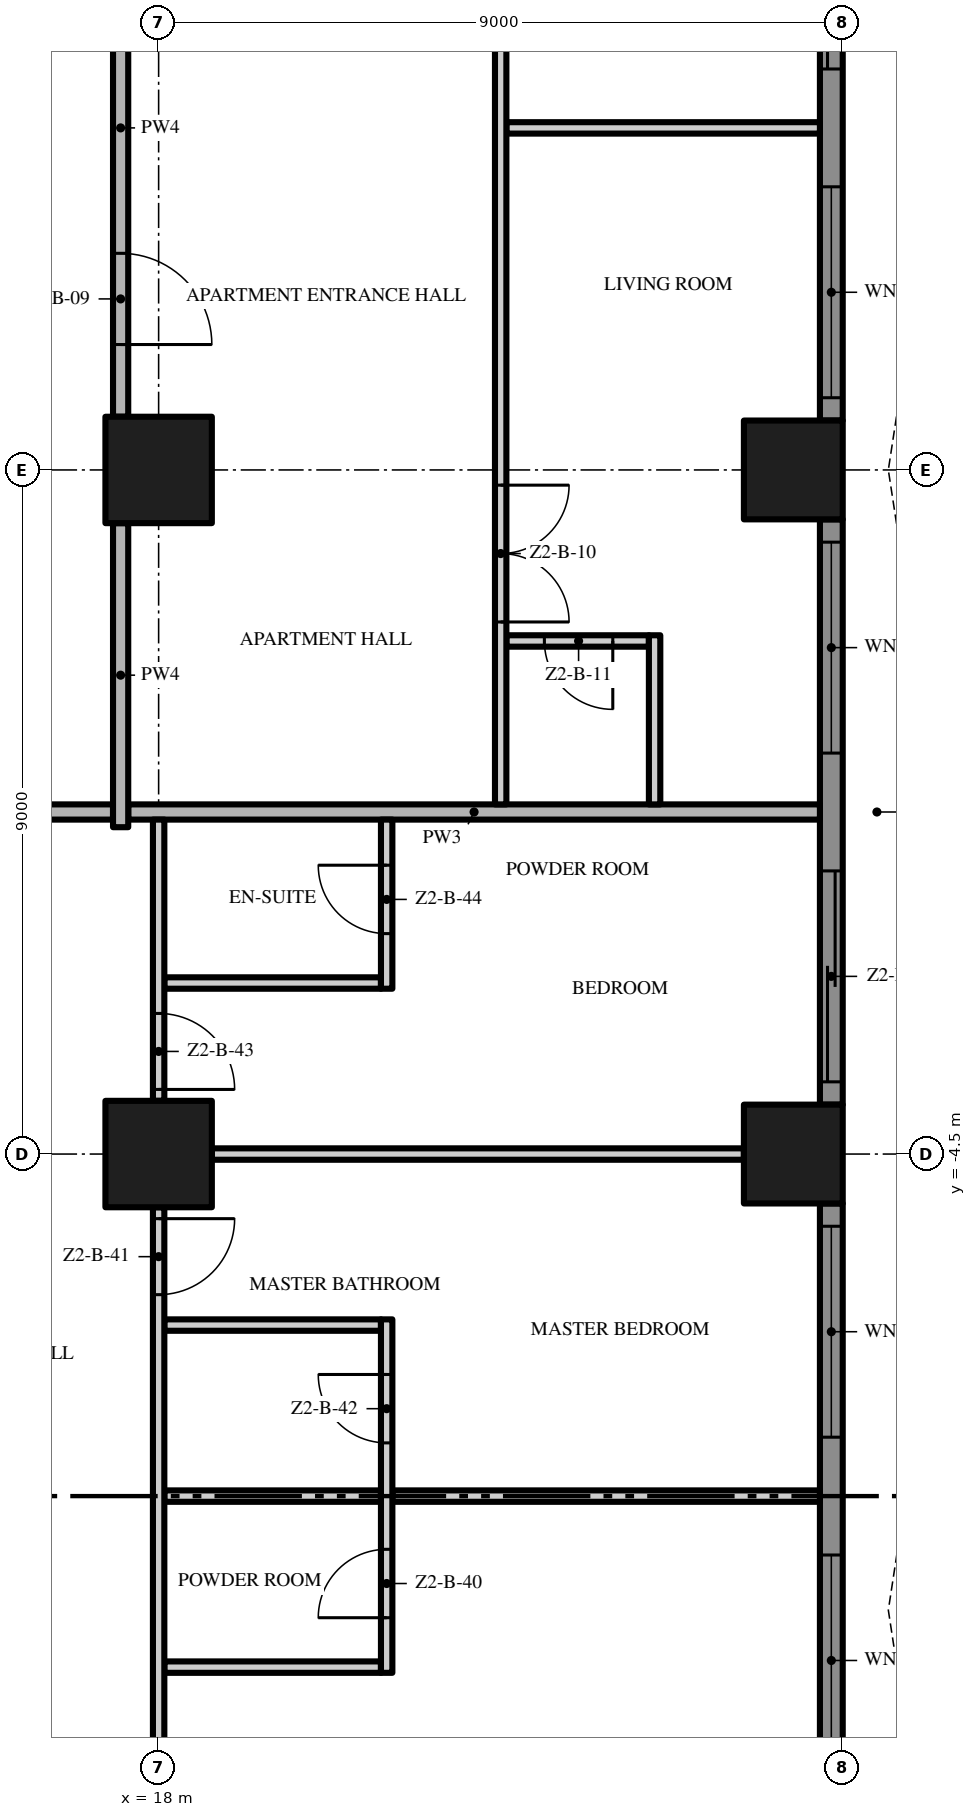
"""IFC4 building model, lengths in metres.
Left out: names, types, materials, properties, quantities, classifications, styles, units other than length and angle.
Written with IfcOpenShell. Run it as: python <this file> out.ifc"""

import sys

from ifc_helpers import new_model, si_unit, direction, frame, frame_2d, origin, origin_2d, place, context, subcontext, project, spatial, polyline, rectangle, outline, extrude, element, fill, save


model = new_model("IFC4")
c1 = context("Model", 3, precision=1e-05, world=origin(), true_north=direction((0.0, 1.0)))
c2 = subcontext(c1, "Body", "Model", "MODEL_VIEW")
j1 = project(units=[si_unit("LENGTHUNIT", "METRE"), si_unit("PLANEANGLEUNIT", "RADIAN")], contexts=[c1])
p1 = place(None, origin())
s1 = spatial("IfcSite", under=j1, at=p1, CompositionType="ELEMENT")
p2 = place(p1, origin())
s2 = spatial("IfcBuilding", under=s1, at=p2, CompositionType="ELEMENT")
p3 = place(p2, frame((0.0, 0.0, 84.6)))
s3 = spatial("IfcBuildingStorey", under=s2, at=p3, CompositionType="ELEMENT", Elevation=84.6)
for number, where, z_axis, x_axis in (
    (1, (18.0, -4.5, 0.0), (0.0, 0.0, 1.0), (1.0, 0.0, 0.0)),
    (2, (18.0, 4.5, 0.0), (0.0, 0.0, 1.0), (1.0, 0.0, 0.0)),
):
    element("IfcColumn", number, at=place(p3, frame(where, z_axis=z_axis, x_axis=x_axis)), inside=s3, PredefinedType="COLUMN", context=c2, shape_type="SweptSolid", body=[
        extrude(rectangle(XDim=1.4, YDim=1.4, at=origin_2d()), origin(), (0.0, 0.0, 1.0), 3.5),
    ])
for number, where, z_axis, x_axis in (
    (3, (26.35, -4.5, 0.0), (0.0, 0.0, 1.0), (1.0, 0.0, 0.0)),
    (4, (26.35, 4.5, 0.0), (0.0, 0.0, 1.0), (1.0, 0.0, 0.0)),
):
    element("IfcColumn", number, at=place(p3, frame(where, z_axis=z_axis, x_axis=x_axis)), inside=s3, PredefinedType="COLUMN", context=c2, shape_type="SweptSolid", body=[
        extrude(rectangle(XDim=1.3, YDim=1.3, at=origin_2d()), origin(), (0.0, 0.0, 1.0), 3.5),
    ])
p4 = place(p3, frame((26.85, -5.15, 0.0), z_axis=(0.0, 0.0, 1.0), x_axis=(0.0, -1.0, 0.0)))
e5 = element("IfcWall", 5, at=p4, inside=s3, PredefinedType="SOLIDWALL", context=c2, shape_type="SweptSolid", body=[
    extrude(rectangle(XDim=7.7, YDim=0.3, at=frame_2d((3.85, 0.0))), origin(), (0.0, 0.0, 1.0), 3.5),
])
p5 = place(p4, frame((4.625, 0.0, 0.45)))
e6 = element("IfcOpeningElement", 6, at=p5, cuts=e5, PredefinedType="OPENING", context=c2, shape_type="SweptSolid", body=[
    extrude(rectangle(XDim=2.775, YDim=2.65, at=frame_2d((1.387, 1.325))), frame((0.0, 0.16, 0.0), z_axis=(0.0, -1.0, 0.0), x_axis=(1.0, 0.0, 0.0)), (0.0, 0.0, 1.0), 0.32),
])
p6 = place(p4, frame((0.3, 0.0, 0.45)))
e7 = element("IfcOpeningElement", 7, at=p6, cuts=e5, PredefinedType="OPENING", context=c2, shape_type="SweptSolid", body=[
    extrude(rectangle(XDim=2.775, YDim=2.65, at=frame_2d((1.387, 1.325))), frame((0.0, 0.16, 0.0), z_axis=(0.0, -1.0, 0.0), x_axis=(1.0, 0.0, 0.0)), (0.0, 0.0, 1.0), 0.32),
])
p7 = place(p3, frame((26.85, 3.85, 0.0), z_axis=(0.0, 0.0, 1.0), x_axis=(0.0, -1.0, 0.0)))
e8 = element("IfcWall", 8, at=p7, inside=s3, PredefinedType="SOLIDWALL", context=c2, shape_type="SweptSolid", body=[
    extrude(rectangle(XDim=7.7, YDim=0.3, at=frame_2d((3.85, 0.0))), origin(), (0.0, 0.0, 1.0), 3.5),
])
p8 = place(p7, frame((4.625, 0.0, 0.0)))
e9 = element("IfcOpeningElement", 9, at=p8, cuts=e8, PredefinedType="OPENING", context=c2, shape_type="SweptSolid", body=[
    extrude(rectangle(XDim=2.775, YDim=2.4, at=frame_2d((1.387, 1.2))), frame((0.0, 0.16, 0.0), z_axis=(0.0, -1.0, 0.0), x_axis=(1.0, 0.0, 0.0)), (0.0, 0.0, 1.0), 0.32),
])
p9 = place(p7, frame((0.3, 0.0, 0.45)))
e10 = element("IfcOpeningElement", 10, at=p9, cuts=e8, PredefinedType="OPENING", context=c2, shape_type="SweptSolid", body=[
    extrude(rectangle(XDim=2.775, YDim=2.65, at=frame_2d((1.387, 1.325))), frame((0.0, 0.16, 0.0), z_axis=(0.0, -1.0, 0.0), x_axis=(1.0, 0.0, 0.0)), (0.0, 0.0, 1.0), 0.32),
])
p10 = place(p3, frame((26.85, 12.85, 0.0), z_axis=(0.0, 0.0, 1.0), x_axis=(0.0, -1.0, 0.0)))
e11 = element("IfcWall", 11, at=p10, inside=s3, PredefinedType="SOLIDWALL", context=c2, shape_type="SweptSolid", body=[
    extrude(rectangle(XDim=7.7, YDim=0.3, at=frame_2d((3.85, 0.0))), origin(), (0.0, 0.0, 1.0), 3.5),
])
p11 = place(p10, frame((4.625, 0.0, 0.45)))
e12 = element("IfcOpeningElement", 12, at=p11, cuts=e11, PredefinedType="OPENING", context=c2, shape_type="SweptSolid", body=[
    extrude(rectangle(XDim=2.775, YDim=2.65, at=frame_2d((1.387, 1.325))), frame((0.0, 0.16, 0.0), z_axis=(0.0, -1.0, 0.0), x_axis=(1.0, 0.0, 0.0)), (0.0, 0.0, 1.0), 0.32),
])
p12 = place(p10, frame((0.3, 0.0, 0.0)))
e13 = element("IfcOpeningElement", 13, at=p12, cuts=e11, PredefinedType="OPENING", context=c2, shape_type="SweptSolid", body=[
    extrude(rectangle(XDim=2.775, YDim=2.4, at=frame_2d((1.387, 1.2))), frame((0.0, 0.16, 0.0), z_axis=(0.0, -1.0, 0.0), x_axis=(1.0, 0.0, 0.0)), (0.0, 0.0, 1.0), 0.32),
])
p13 = place(p3, origin())
e14 = element("IfcWall", 14, at=p13, inside=s3, PredefinedType="USERDEFINED", context=c2, shape_type="SweptSolid", body=[
    extrude(outline(polyline([(30.0, -18.0), (29.771, -16.5), (29.171, -15.0), (28.429, -13.5), (27.829, -12.0), (27.6, -10.5), (27.829, -9.0), (28.429, -7.5), (29.171, -6.0), (29.771, -4.5), (30.0, -3.0), (29.771, -1.5), (29.171, 0.0), (28.429, 1.5), (27.829, 3.0), (27.6, 4.5), (27.829, 6.0), (28.429, 7.5), (29.171, 9.0), (29.771, 10.5), (30.0, 12.0), (29.771, 13.5), (29.171, 15.0), (28.429, 16.5), (27.829, 18.0), (27.597, 17.907), (28.201, 16.398), (28.942, 14.898), (29.528, 13.434), (29.747, 12.0), (29.528, 10.566), (28.942, 9.102), (28.201, 7.602), (27.586, 6.066), (27.347, 4.5), (27.586, 2.934), (28.201, 1.398), (28.942, -0.102), (29.528, -1.566), (29.747, -3.0), (29.528, -4.434), (28.942, -5.898), (28.201, -7.398), (27.586, -8.934), (27.347, -10.5), (27.586, -12.066), (28.201, -13.602), (28.942, -15.102), (29.528, -16.566), (29.753, -18.038), (30.0, -18.0)])), origin(), (0.0, 0.0, 1.0), 0.9),
])
for number, where, z_axis, x_axis in (
    (15, (18.075, -11.25, 0.0), (0.0, 0.0, 1.0), (1.0, 0.0, 0.0)),
    (16, (18.075, -9.0, 0.0), (0.0, 0.0, 1.0), (1.0, 0.0, 0.0)),
):
    element("IfcWall", number, at=place(p3, frame(where, z_axis=z_axis, x_axis=x_axis)), inside=s3, PredefinedType="PARTITIONING", context=c2, shape_type="SweptSolid", body=[
        extrude(rectangle(XDim=2.85, YDim=0.15, at=frame_2d((1.425, 0.0))), origin(), (0.0, 0.0, 1.0), 3.5),
    ])
p14 = place(p3, frame((21.075, -9.0, 0.0), z_axis=(0.0, 0.0, 1.0), x_axis=(1.0, 0.0, 0.0)))
e17 = element("IfcWall", 17, at=p14, inside=s3, PredefinedType="PARTITIONING", context=c2, shape_type="SweptSolid", body=[
    extrude(rectangle(XDim=5.625, YDim=0.15, at=frame_2d((2.812, 0.0))), origin(), (0.0, 0.0, 1.0), 3.5),
])
p15 = place(p3, frame((18.075, -6.75, 0.0), z_axis=(0.0, 0.0, 1.0), x_axis=(1.0, 0.0, 0.0)))
e18 = element("IfcWall", 18, at=p15, inside=s3, PredefinedType="PARTITIONING", context=c2, shape_type="SweptSolid", body=[
    extrude(rectangle(XDim=2.85, YDim=0.15, at=frame_2d((1.425, 0.0))), origin(), (0.0, 0.0, 1.0), 3.5),
])
p16 = place(p3, frame((18.7, -4.5, 0.0), z_axis=(0.0, 0.0, 1.0), x_axis=(1.0, 0.0, 0.0)))
e19 = element("IfcWall", 19, at=p16, inside=s3, PredefinedType="PARTITIONING", context=c2, shape_type="SweptSolid", body=[
    extrude(rectangle(XDim=7.0, YDim=0.15, at=frame_2d((3.5, 0.0))), origin(), (0.0, 0.0, 1.0), 3.5),
])
p17 = place(p3, frame((18.075, -2.25, 0.0), z_axis=(0.0, 0.0, 1.0), x_axis=(1.0, 0.0, 0.0)))
e20 = element("IfcWall", 20, at=p17, inside=s3, PredefinedType="PARTITIONING", context=c2, shape_type="SweptSolid", body=[
    extrude(rectangle(XDim=2.85, YDim=0.15, at=frame_2d((1.425, 0.0))), origin(), (0.0, 0.0, 1.0), 3.5),
])
p18 = place(p3, frame((4.6, 0.0, 0.0), z_axis=(0.0, 0.0, 1.0), x_axis=(1.0, 0.0, 0.0)))
e21 = element("IfcWall", 21, at=p18, inside=s3, PredefinedType="PARTITIONING", context=c2, shape_type="SweptSolid", body=[
    extrude(rectangle(XDim=12.8, YDim=0.2, at=frame_2d((6.4, 0.0))), origin(), (0.0, 0.0, 1.0), 3.5),
])
p19 = place(p3, frame((17.6, 0.0, 0.0), z_axis=(0.0, 0.0, 1.0), x_axis=(1.0, 0.0, 0.0)))
e22 = element("IfcWall", 22, at=p19, inside=s3, PredefinedType="PARTITIONING", context=c2, shape_type="SweptSolid", body=[
    extrude(rectangle(XDim=9.1, YDim=0.2, at=frame_2d((4.55, 0.0))), origin(), (0.0, 0.0, 1.0), 3.5),
])
p20 = place(p3, frame((24.45, 2.25, 0.0), z_axis=(0.0, 0.0, 1.0), x_axis=(-1.0, 0.0, 0.0)))
e23 = element("IfcWall", 23, at=p20, inside=s3, PredefinedType="PARTITIONING", context=c2, shape_type="SweptSolid", body=[
    extrude(rectangle(XDim=1.875, YDim=0.15, at=frame_2d((0.938, 0.0))), origin(), (0.0, 0.0, 1.0), 3.5),
])
p21 = place(p20, frame((0.475, 0.0, 0.0)))
e24 = element("IfcOpeningElement", 24, at=p21, cuts=e23, PredefinedType="OPENING", context=c2, shape_type="SweptSolid", body=[
    extrude(rectangle(XDim=0.9, YDim=2.1, at=frame_2d((0.45, 1.05))), frame((0.0, 0.085, 0.0), z_axis=(0.0, -1.0, 0.0), x_axis=(1.0, 0.0, 0.0)), (0.0, 0.0, 1.0), 0.17),
])
p22 = place(p3, frame((22.575, 9.0, 0.0), z_axis=(0.0, 0.0, 1.0), x_axis=(1.0, 0.0, 0.0)))
e25 = element("IfcWall", 25, at=p22, inside=s3, PredefinedType="PARTITIONING", context=c2, shape_type="SweptSolid", body=[
    extrude(rectangle(XDim=4.125, YDim=0.15, at=frame_2d((2.062, 0.0))), origin(), (0.0, 0.0, 1.0), 3.5),
])
p23 = place(p3, frame((17.5, -0.2, 0.0), z_axis=(0.0, 0.0, 1.0), x_axis=(0.0, 1.0, 0.0)))
e26 = element("IfcWall", 26, at=p23, inside=s3, PredefinedType="PARTITIONING", context=c2, shape_type="SweptSolid", body=[
    extrude(rectangle(XDim=4.0, YDim=0.2, at=frame_2d((2.0, 0.0))), origin(), (0.0, 0.0, 1.0), 3.5),
])
p24 = place(p3, frame((17.5, 12.8, 0.0), z_axis=(0.0, 0.0, 1.0), x_axis=(0.0, -1.0, 0.0)))
e27 = element("IfcWall", 27, at=p24, inside=s3, PredefinedType="PARTITIONING", context=c2, shape_type="SweptSolid", body=[
    extrude(rectangle(XDim=7.6, YDim=0.2, at=frame_2d((3.8, 0.0))), origin(), (0.0, 0.0, 1.0), 3.5),
])
p25 = place(p24, frame((5.45, 0.0, 0.0)))
e28 = element("IfcOpeningElement", 28, at=p25, cuts=e27, PredefinedType="OPENING", context=c2, shape_type="SweptSolid", body=[
    extrude(rectangle(XDim=1.2, YDim=2.4, at=frame_2d((0.6, 1.2))), frame((0.0, 0.11, 0.0), z_axis=(0.0, -1.0, 0.0), x_axis=(1.0, 0.0, 0.0)), (0.0, 0.0, 1.0), 0.22),
])
p26 = place(p3, frame((18.0, -5.2, 0.0), z_axis=(0.0, 0.0, 1.0), x_axis=(0.0, -1.0, 0.0)))
e29 = element("IfcWall", 29, at=p26, inside=s3, PredefinedType="PARTITIONING", context=c2, shape_type="SweptSolid", body=[
    extrude(rectangle(XDim=7.6, YDim=0.15, at=frame_2d((3.8, 0.0))), origin(), (0.0, 0.0, 1.0), 3.5),
])
p27 = place(p26, frame((0.15, 0.0, 0.0)))
e30 = element("IfcOpeningElement", 30, at=p27, cuts=e29, PredefinedType="OPENING", context=c2, shape_type="SweptSolid", body=[
    extrude(rectangle(XDim=1.0, YDim=2.4, at=frame_2d((0.5, 1.2))), frame((0.0, 0.085, 0.0), z_axis=(0.0, -1.0, 0.0), x_axis=(1.0, 0.0, 0.0)), (0.0, 0.0, 1.0), 0.17),
])
p28 = place(p3, frame((18.0, -0.1, 0.0), z_axis=(0.0, 0.0, 1.0), x_axis=(0.0, -1.0, 0.0)))
e31 = element("IfcWall", 31, at=p28, inside=s3, PredefinedType="PARTITIONING", context=c2, shape_type="SweptSolid", body=[
    extrude(rectangle(XDim=3.7, YDim=0.15, at=frame_2d((1.85, 0.0))), origin(), (0.0, 0.0, 1.0), 3.5),
])
p29 = place(p28, frame((2.55, 0.0, 0.0)))
e32 = element("IfcOpeningElement", 32, at=p29, cuts=e31, PredefinedType="OPENING", context=c2, shape_type="SweptSolid", body=[
    extrude(rectangle(XDim=1.0, YDim=2.4, at=frame_2d((0.5, 1.2))), frame((0.0, 0.085, 0.0), z_axis=(0.0, -1.0, 0.0), x_axis=(1.0, 0.0, 0.0)), (0.0, 0.0, 1.0), 0.17),
])
p30 = place(p3, frame((21.0, -11.325, 0.0), z_axis=(0.0, 0.0, 1.0), x_axis=(0.0, 1.0, 0.0)))
e33 = element("IfcWall", 33, at=p30, inside=s3, PredefinedType="PARTITIONING", context=c2, shape_type="SweptSolid", body=[
    extrude(rectangle(XDim=4.65, YDim=0.15, at=frame_2d((2.325, 0.0))), origin(), (0.0, 0.0, 1.0), 3.5),
])
p31 = place(p30, frame((0.725, 0.0, 0.0)))
e34 = element("IfcOpeningElement", 34, at=p31, cuts=e33, PredefinedType="OPENING", context=c2, shape_type="SweptSolid", body=[
    extrude(rectangle(XDim=0.9, YDim=2.1, at=frame_2d((0.45, 1.05))), frame((0.0, 0.085, 0.0), z_axis=(0.0, -1.0, 0.0), x_axis=(1.0, 0.0, 0.0)), (0.0, 0.0, 1.0), 0.17),
])
p32 = place(p30, frame((3.025, 0.0, 0.0)))
e35 = element("IfcOpeningElement", 35, at=p32, cuts=e33, PredefinedType="OPENING", context=c2, shape_type="SweptSolid", body=[
    extrude(rectangle(XDim=0.9, YDim=2.1, at=frame_2d((0.45, 1.05))), frame((0.0, 0.085, 0.0), z_axis=(0.0, -1.0, 0.0), x_axis=(1.0, 0.0, 0.0)), (0.0, 0.0, 1.0), 0.17),
])
p33 = place(p3, frame((21.0, -2.325, 0.0), z_axis=(0.0, 0.0, 1.0), x_axis=(0.0, 1.0, 0.0)))
e36 = element("IfcWall", 36, at=p33, inside=s3, PredefinedType="PARTITIONING", context=c2, shape_type="SweptSolid", body=[
    extrude(rectangle(XDim=2.225, YDim=0.15, at=frame_2d((1.113, 0.0))), origin(), (0.0, 0.0, 1.0), 3.5),
])
p34 = place(p33, frame((0.725, 0.0, 0.0)))
e37 = element("IfcOpeningElement", 37, at=p34, cuts=e36, PredefinedType="OPENING", context=c2, shape_type="SweptSolid", body=[
    extrude(rectangle(XDim=0.9, YDim=2.1, at=frame_2d((0.45, 1.05))), frame((0.0, 0.085, 0.0), z_axis=(0.0, -1.0, 0.0), x_axis=(1.0, 0.0, 0.0)), (0.0, 0.0, 1.0), 0.17),
])
p35 = place(p3, frame((22.5, 17.35, 0.0), z_axis=(0.0, 0.0, 1.0), x_axis=(0.0, -1.0, 0.0)))
e38 = element("IfcWall", 38, at=p35, inside=s3, PredefinedType="PARTITIONING", context=c2, shape_type="SweptSolid", body=[
    extrude(rectangle(XDim=17.25, YDim=0.15, at=frame_2d((8.625, 0.0))), origin(), (0.0, 0.0, 1.0), 3.5),
])
p36 = place(p35, frame((13.05, 0.0, 0.0)))
e39 = element("IfcOpeningElement", 39, at=p36, cuts=e38, PredefinedType="OPENING", context=c2, shape_type="SweptSolid", body=[
    extrude(rectangle(XDim=1.8, YDim=2.4, at=frame_2d((0.9, 1.2))), frame((0.0, 0.085, 0.0), z_axis=(0.0, -1.0, 0.0), x_axis=(1.0, 0.0, 0.0)), (0.0, 0.0, 1.0), 0.17),
])
p37 = place(p35, frame((5.6, 0.0, 0.0)))
e40 = element("IfcOpeningElement", 40, at=p37, cuts=e38, PredefinedType="OPENING", context=c2, shape_type="SweptSolid", body=[
    extrude(rectangle(XDim=1.0, YDim=2.4, at=frame_2d((0.5, 1.2))), frame((0.0, 0.085, 0.0), z_axis=(0.0, -1.0, 0.0), x_axis=(1.0, 0.0, 0.0)), (0.0, 0.0, 1.0), 0.17),
])
p38 = place(p3, frame((24.525, 0.1, 0.0), z_axis=(0.0, 0.0, 1.0), x_axis=(0.0, 1.0, 0.0)))
e41 = element("IfcWall", 41, at=p38, inside=s3, PredefinedType="PARTITIONING", context=c2, shape_type="SweptSolid", body=[
    extrude(rectangle(XDim=2.225, YDim=0.15, at=frame_2d((1.113, 0.0))), origin(), (0.0, 0.0, 1.0), 3.5),
])
p39 = place(p5, origin())
e42 = element("IfcWindow", 42, at=p39, inside=s3, PartitioningType="SINGLE_PANEL", PredefinedType="WINDOW", context=c2, shape_type="SweptSolid", body=[
    extrude(rectangle(XDim=2.775, YDim=2.65, at=frame_2d((1.387, 1.325))), frame((0.0, 0.03, 0.0), z_axis=(0.0, -1.0, 0.0), x_axis=(1.0, 0.0, 0.0)), (0.0, 0.0, 1.0), 0.06),
])
fill(e6, e42)
p40 = place(p6, origin())
e43 = element("IfcWindow", 43, at=p40, inside=s3, PartitioningType="SINGLE_PANEL", PredefinedType="WINDOW", context=c2, shape_type="SweptSolid", body=[
    extrude(rectangle(XDim=2.775, YDim=2.65, at=frame_2d((1.387, 1.325))), frame((0.0, 0.03, 0.0), z_axis=(0.0, -1.0, 0.0), x_axis=(1.0, 0.0, 0.0)), (0.0, 0.0, 1.0), 0.06),
])
fill(e7, e43)
p41 = place(p8, origin())
e44 = element("IfcDoor", 44, at=p41, inside=s3, OperationType="SINGLE_SWING_LEFT", PredefinedType="DOOR", context=c2, shape_type="SweptSolid", body=[
    extrude(rectangle(XDim=2.775, YDim=2.4, at=frame_2d((1.387, 1.2))), frame((0.0, 0.025, 0.0), z_axis=(0.0, -1.0, 0.0), x_axis=(1.0, 0.0, 0.0)), (0.0, 0.0, 1.0), 0.05),
])
fill(e9, e44)
p42 = place(p9, origin())
e45 = element("IfcWindow", 45, at=p42, inside=s3, PartitioningType="SINGLE_PANEL", PredefinedType="WINDOW", context=c2, shape_type="SweptSolid", body=[
    extrude(rectangle(XDim=2.775, YDim=2.65, at=frame_2d((1.387, 1.325))), frame((0.0, 0.03, 0.0), z_axis=(0.0, -1.0, 0.0), x_axis=(1.0, 0.0, 0.0)), (0.0, 0.0, 1.0), 0.06),
])
fill(e10, e45)
p43 = place(p11, origin())
e46 = element("IfcWindow", 46, at=p43, inside=s3, PartitioningType="SINGLE_PANEL", PredefinedType="WINDOW", context=c2, shape_type="SweptSolid", body=[
    extrude(rectangle(XDim=2.775, YDim=2.65, at=frame_2d((1.387, 1.325))), frame((0.0, 0.03, 0.0), z_axis=(0.0, -1.0, 0.0), x_axis=(1.0, 0.0, 0.0)), (0.0, 0.0, 1.0), 0.06),
])
fill(e12, e46)
p44 = place(p12, origin())
e47 = element("IfcDoor", 47, at=p44, inside=s3, OperationType="SINGLE_SWING_LEFT", PredefinedType="DOOR", context=c2, shape_type="SweptSolid", body=[
    extrude(rectangle(XDim=2.775, YDim=2.4, at=frame_2d((1.387, 1.2))), frame((0.0, 0.025, 0.0), z_axis=(0.0, -1.0, 0.0), x_axis=(1.0, 0.0, 0.0)), (0.0, 0.0, 1.0), 0.05),
])
fill(e13, e47)
p45 = place(p25, origin())
e48 = element("IfcDoor", 48, at=p45, inside=s3, OperationType="SINGLE_SWING_RIGHT", PredefinedType="DOOR", context=c2, shape_type="SweptSolid", body=[
    extrude(rectangle(XDim=1.2, YDim=2.4, at=frame_2d((0.6, 1.2))), frame((0.0, 0.025, 0.0), z_axis=(0.0, -1.0, 0.0), x_axis=(1.0, 0.0, 0.0)), (0.0, 0.0, 1.0), 0.05),
])
fill(e28, e48)
p46 = place(p36, origin())
e49 = element("IfcDoor", 49, at=p46, inside=s3, OperationType="DOUBLE_DOOR_SINGLE_SWING", PredefinedType="DOOR", context=c2, shape_type="SweptSolid", body=[
    extrude(rectangle(XDim=1.8, YDim=2.4, at=frame_2d((0.9, 1.2))), frame((0.0, 0.025, 0.0), z_axis=(0.0, -1.0, 0.0), x_axis=(1.0, 0.0, 0.0)), (0.0, 0.0, 1.0), 0.05),
])
fill(e39, e49)
p47 = place(p21, origin())
e50 = element("IfcDoor", 50, at=p47, inside=s3, OperationType="SINGLE_SWING_LEFT", PredefinedType="DOOR", context=c2, shape_type="SweptSolid", body=[
    extrude(rectangle(XDim=0.9, YDim=2.1, at=frame_2d((0.45, 1.05))), frame((0.0, 0.025, 0.0), z_axis=(0.0, -1.0, 0.0), x_axis=(1.0, 0.0, 0.0)), (0.0, 0.0, 1.0), 0.05),
])
fill(e24, e50)
p48 = place(p31, origin())
e51 = element("IfcDoor", 51, at=p48, inside=s3, OperationType="SINGLE_SWING_LEFT", PredefinedType="DOOR", context=c2, shape_type="SweptSolid", body=[
    extrude(rectangle(XDim=0.9, YDim=2.1, at=frame_2d((0.45, 1.05))), frame((0.0, 0.025, 0.0), z_axis=(0.0, -1.0, 0.0), x_axis=(1.0, 0.0, 0.0)), (0.0, 0.0, 1.0), 0.05),
])
fill(e34, e51)
p49 = place(p27, origin())
e52 = element("IfcDoor", 52, at=p49, inside=s3, OperationType="SINGLE_SWING_LEFT", PredefinedType="DOOR", context=c2, shape_type="SweptSolid", body=[
    extrude(rectangle(XDim=1.0, YDim=2.4, at=frame_2d((0.5, 1.2))), frame((0.0, 0.025, 0.0), z_axis=(0.0, -1.0, 0.0), x_axis=(1.0, 0.0, 0.0)), (0.0, 0.0, 1.0), 0.05),
])
fill(e30, e52)
p50 = place(p32, origin())
e53 = element("IfcDoor", 53, at=p50, inside=s3, OperationType="SINGLE_SWING_RIGHT", PredefinedType="DOOR", context=c2, shape_type="SweptSolid", body=[
    extrude(rectangle(XDim=0.9, YDim=2.1, at=frame_2d((0.45, 1.05))), frame((0.0, 0.025, 0.0), z_axis=(0.0, -1.0, 0.0), x_axis=(1.0, 0.0, 0.0)), (0.0, 0.0, 1.0), 0.05),
])
fill(e35, e53)
p51 = place(p29, origin())
e54 = element("IfcDoor", 54, at=p51, inside=s3, OperationType="SINGLE_SWING_RIGHT", PredefinedType="DOOR", context=c2, shape_type="SweptSolid", body=[
    extrude(rectangle(XDim=1.0, YDim=2.4, at=frame_2d((0.5, 1.2))), frame((0.0, 0.025, 0.0), z_axis=(0.0, -1.0, 0.0), x_axis=(1.0, 0.0, 0.0)), (0.0, 0.0, 1.0), 0.05),
])
fill(e32, e54)
p52 = place(p34, origin())
e55 = element("IfcDoor", 55, at=p52, inside=s3, OperationType="SINGLE_SWING_RIGHT", PredefinedType="DOOR", context=c2, shape_type="SweptSolid", body=[
    extrude(rectangle(XDim=0.9, YDim=2.1, at=frame_2d((0.45, 1.05))), frame((0.0, 0.025, 0.0), z_axis=(0.0, -1.0, 0.0), x_axis=(1.0, 0.0, 0.0)), (0.0, 0.0, 1.0), 0.05),
])
fill(e37, e55)
save(model, sys.argv[1])
